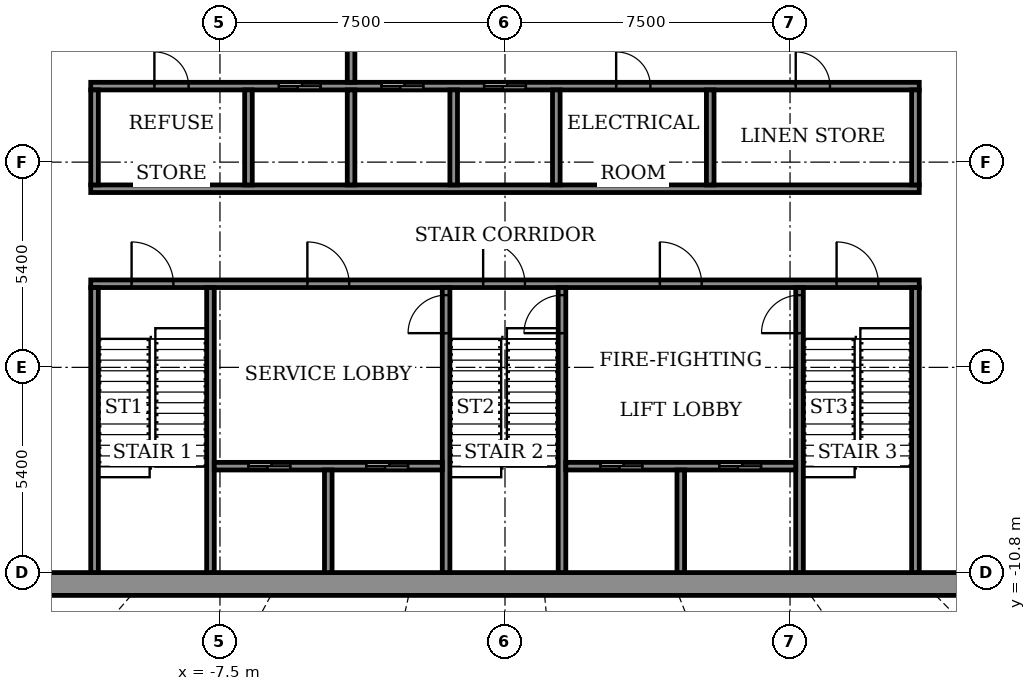
"""IFC4 building model, lengths in metres.
Left out: names, types, materials, properties, quantities, classifications, styles, units other than length and angle.
Written with IfcOpenShell. Run it as: python <this file> out.ifc"""

import sys

from ifc_helpers import new_model, si_unit, direction, frame, frame_2d, origin, place, context, subcontext, project, spatial, rectangle, extrude, element, fill, save


model = new_model("IFC4")
c1 = context("Model", 3, precision=1e-05, world=origin(), true_north=direction((0.0, 1.0)))
c2 = subcontext(c1, "Body", "Model", "MODEL_VIEW")
j1 = project(units=[si_unit("LENGTHUNIT", "METRE"), si_unit("PLANEANGLEUNIT", "RADIAN")], contexts=[c1])
p1 = place(None, origin())
s1 = spatial("IfcSite", under=j1, at=p1, CompositionType="ELEMENT")
p2 = place(p1, origin())
s2 = spatial("IfcBuilding", under=s1, at=p2, CompositionType="ELEMENT")
p3 = place(p2, frame((0.0, 0.0, 329.7)))
s3 = spatial("IfcBuildingStorey", under=s2, at=p3, CompositionType="ELEMENT", Elevation=329.7)
p4 = place(p3, frame((-14.4, -11.1, 0.0), z_axis=(0.0, 0.0, 1.0), x_axis=(1.0, 0.0, 0.0)))
e1 = element("IfcWall", 1, at=p4, inside=s3, PredefinedType="SHEAR", context=c2, shape_type="SweptSolid", body=[
    extrude(rectangle(XDim=28.8, YDim=0.6, at=frame_2d((14.4, 0.0))), origin(), (0.0, 0.0, 1.0), 4.6),
])
p5 = place(p3, frame((-10.9, -3.2, 0.0), z_axis=(0.0, 0.0, 1.0), x_axis=(1.0, 0.0, 0.0)))
e2 = element("IfcWall", 2, at=p5, inside=s3, PredefinedType="SHEAR", context=c2, shape_type="SweptSolid", body=[
    extrude(rectangle(XDim=21.8, YDim=0.2, at=frame_2d((10.9, 0.0))), origin(), (0.0, 0.0, 1.0), 4.05),
])
p6 = place(p5, frame((1.075, 0.0, 0.0)))
e3 = element("IfcOpeningElement", 3, at=p6, cuts=e2, PredefinedType="OPENING", context=c2, shape_type="SweptSolid", body=[
    extrude(rectangle(XDim=1.1, YDim=2.1, at=frame_2d((0.55, 1.05))), frame((0.0, 0.11, 0.0), z_axis=(0.0, -1.0, 0.0), x_axis=(1.0, 0.0, 0.0)), (0.0, 0.0, 1.0), 0.22),
])
p7 = place(p5, frame((10.325, 0.0, 0.0)))
e4 = element("IfcOpeningElement", 4, at=p7, cuts=e2, PredefinedType="OPENING", context=c2, shape_type="SweptSolid", body=[
    extrude(rectangle(XDim=1.1, YDim=2.1, at=frame_2d((0.55, 1.05))), frame((0.0, 0.11, 0.0), z_axis=(0.0, -1.0, 0.0), x_axis=(1.0, 0.0, 0.0)), (0.0, 0.0, 1.0), 0.22),
])
p8 = place(p5, frame((19.625, 0.0, 0.0)))
e5 = element("IfcOpeningElement", 5, at=p8, cuts=e2, PredefinedType="OPENING", context=c2, shape_type="SweptSolid", body=[
    extrude(rectangle(XDim=1.1, YDim=2.1, at=frame_2d((0.55, 1.05))), frame((0.0, 0.11, 0.0), z_axis=(0.0, -1.0, 0.0), x_axis=(1.0, 0.0, 0.0)), (0.0, 0.0, 1.0), 0.22),
])
p9 = place(p5, frame((5.7, 0.0, 0.0)))
e6 = element("IfcOpeningElement", 6, at=p9, cuts=e2, PredefinedType="OPENING", context=c2, shape_type="SweptSolid", body=[
    extrude(rectangle(XDim=1.1, YDim=2.1, at=frame_2d((0.55, 1.05))), frame((0.0, 0.11, 0.0), z_axis=(0.0, -1.0, 0.0), x_axis=(1.0, 0.0, 0.0)), (0.0, 0.0, 1.0), 0.22),
])
p10 = place(p5, frame((14.975, 0.0, 0.0)))
e7 = element("IfcOpeningElement", 7, at=p10, cuts=e2, PredefinedType="OPENING", context=c2, shape_type="SweptSolid", body=[
    extrude(rectangle(XDim=1.1, YDim=2.1, at=frame_2d((0.55, 1.05))), frame((0.0, 0.11, 0.0), z_axis=(0.0, -1.0, 0.0), x_axis=(1.0, 0.0, 0.0)), (0.0, 0.0, 1.0), 0.22),
])
p11 = place(p3, frame((-10.9, -0.7, 0.0), z_axis=(0.0, 0.0, 1.0), x_axis=(1.0, 0.0, 0.0)))
e8 = element("IfcWall", 8, at=p11, inside=s3, PredefinedType="SHEAR", context=c2, shape_type="SweptSolid", body=[
    extrude(rectangle(XDim=21.8, YDim=0.2, at=frame_2d((10.9, 0.0))), origin(), (0.0, 0.0, 1.0), 4.05),
])
p12 = place(p3, frame((-10.9, 2.0, 0.0), z_axis=(0.0, 0.0, 1.0), x_axis=(1.0, 0.0, 0.0)))
e9 = element("IfcWall", 9, at=p12, inside=s3, PredefinedType="SHEAR", context=c2, shape_type="SweptSolid", body=[
    extrude(rectangle(XDim=21.8, YDim=0.2, at=frame_2d((10.9, 0.0))), origin(), (0.0, 0.0, 1.0), 4.05),
])
p13 = place(p12, frame((4.95, 0.0, 0.0)))
e10 = element("IfcOpeningElement", 10, at=p13, cuts=e9, PredefinedType="OPENING", context=c2, shape_type="SweptSolid", body=[
    extrude(rectangle(XDim=1.1, YDim=2.1, at=frame_2d((0.55, 1.05))), frame((0.0, 0.11, 0.0), z_axis=(0.0, -1.0, 0.0), x_axis=(1.0, 0.0, 0.0)), (0.0, 0.0, 1.0), 0.22),
])
p14 = place(p12, frame((7.65, 0.0, 0.0)))
e11 = element("IfcOpeningElement", 11, at=p14, cuts=e9, PredefinedType="OPENING", context=c2, shape_type="SweptSolid", body=[
    extrude(rectangle(XDim=1.1, YDim=2.1, at=frame_2d((0.55, 1.05))), frame((0.0, 0.11, 0.0), z_axis=(0.0, -1.0, 0.0), x_axis=(1.0, 0.0, 0.0)), (0.0, 0.0, 1.0), 0.22),
])
p15 = place(p12, frame((10.35, 0.0, 0.0)))
e12 = element("IfcOpeningElement", 12, at=p15, cuts=e9, PredefinedType="OPENING", context=c2, shape_type="SweptSolid", body=[
    extrude(rectangle(XDim=1.1, YDim=2.1, at=frame_2d((0.55, 1.05))), frame((0.0, 0.11, 0.0), z_axis=(0.0, -1.0, 0.0), x_axis=(1.0, 0.0, 0.0)), (0.0, 0.0, 1.0), 0.22),
])
p16 = place(p12, frame((1.675, 0.0, 0.0)))
e13 = element("IfcOpeningElement", 13, at=p16, cuts=e9, PredefinedType="OPENING", context=c2, shape_type="SweptSolid", body=[
    extrude(rectangle(XDim=0.9, YDim=2.1, at=frame_2d((0.45, 1.05))), frame((0.0, 0.11, 0.0), z_axis=(0.0, -1.0, 0.0), x_axis=(1.0, 0.0, 0.0)), (0.0, 0.0, 1.0), 0.22),
])
p17 = place(p12, frame((13.825, 0.0, 0.0)))
e14 = element("IfcOpeningElement", 14, at=p17, cuts=e9, PredefinedType="OPENING", context=c2, shape_type="SweptSolid", body=[
    extrude(rectangle(XDim=0.9, YDim=2.1, at=frame_2d((0.45, 1.05))), frame((0.0, 0.11, 0.0), z_axis=(0.0, -1.0, 0.0), x_axis=(1.0, 0.0, 0.0)), (0.0, 0.0, 1.0), 0.22),
])
p18 = place(p12, frame((18.55, 0.0, 0.0)))
e15 = element("IfcOpeningElement", 15, at=p18, cuts=e9, PredefinedType="OPENING", context=c2, shape_type="SweptSolid", body=[
    extrude(rectangle(XDim=0.9, YDim=2.1, at=frame_2d((0.45, 1.05))), frame((0.0, 0.11, 0.0), z_axis=(0.0, -1.0, 0.0), x_axis=(1.0, 0.0, 0.0)), (0.0, 0.0, 1.0), 0.22),
])
for number, where, z_axis, x_axis in (
    (16, (-10.8, -10.8, 0.0), (0.0, 0.0, 1.0), (0.0, 1.0, 0.0)),
    (17, (-7.75, -10.8, 0.0), (0.0, 0.0, 1.0), (0.0, 1.0, 0.0)),
):
    element("IfcWall", number, at=place(p3, frame(where, z_axis=z_axis, x_axis=x_axis)), inside=s3, PredefinedType="SHEAR", context=c2, shape_type="SweptSolid", body=[
        extrude(rectangle(XDim=7.5, YDim=0.2, at=frame_2d((3.75, 0.0))), origin(), (0.0, 0.0, 1.0), 4.05),
    ])
p19 = place(p3, frame((-1.55, -10.8, 0.0), z_axis=(0.0, 0.0, 1.0), x_axis=(0.0, 1.0, 0.0)))
e18 = element("IfcWall", 18, at=p19, inside=s3, PredefinedType="SHEAR", context=c2, shape_type="SweptSolid", body=[
    extrude(rectangle(XDim=7.5, YDim=0.2, at=frame_2d((3.75, 0.0))), origin(), (0.0, 0.0, 1.0), 4.05),
])
p20 = place(p19, frame((6.3, 0.0, 0.0)))
e19 = element("IfcOpeningElement", 19, at=p20, cuts=e18, PredefinedType="OPENING", context=c2, shape_type="SweptSolid", body=[
    extrude(rectangle(XDim=1.0, YDim=2.1, at=frame_2d((0.5, 1.05))), frame((0.0, 0.11, 0.0), z_axis=(0.0, -1.0, 0.0), x_axis=(1.0, 0.0, 0.0)), (0.0, 0.0, 1.0), 0.22),
])
p21 = place(p3, frame((1.5, -10.8, 0.0), z_axis=(0.0, 0.0, 1.0), x_axis=(0.0, 1.0, 0.0)))
e20 = element("IfcWall", 20, at=p21, inside=s3, PredefinedType="SHEAR", context=c2, shape_type="SweptSolid", body=[
    extrude(rectangle(XDim=7.5, YDim=0.2, at=frame_2d((3.75, 0.0))), origin(), (0.0, 0.0, 1.0), 4.05),
])
p22 = place(p21, frame((6.3, 0.0, 0.0)))
e21 = element("IfcOpeningElement", 21, at=p22, cuts=e20, PredefinedType="OPENING", context=c2, shape_type="SweptSolid", body=[
    extrude(rectangle(XDim=1.0, YDim=2.1, at=frame_2d((0.5, 1.05))), frame((0.0, 0.11, 0.0), z_axis=(0.0, -1.0, 0.0), x_axis=(1.0, 0.0, 0.0)), (0.0, 0.0, 1.0), 0.22),
])
p23 = place(p3, frame((7.75, -10.8, 0.0), z_axis=(0.0, 0.0, 1.0), x_axis=(0.0, 1.0, 0.0)))
e22 = element("IfcWall", 22, at=p23, inside=s3, PredefinedType="SHEAR", context=c2, shape_type="SweptSolid", body=[
    extrude(rectangle(XDim=7.5, YDim=0.2, at=frame_2d((3.75, 0.0))), origin(), (0.0, 0.0, 1.0), 4.05),
])
p24 = place(p23, frame((6.3, 0.0, 0.0)))
e23 = element("IfcOpeningElement", 23, at=p24, cuts=e22, PredefinedType="OPENING", context=c2, shape_type="SweptSolid", body=[
    extrude(rectangle(XDim=1.0, YDim=2.1, at=frame_2d((0.5, 1.05))), frame((0.0, 0.11, 0.0), z_axis=(0.0, -1.0, 0.0), x_axis=(1.0, 0.0, 0.0)), (0.0, 0.0, 1.0), 0.22),
])
p25 = place(p3, frame((10.8, -10.8, 0.0), z_axis=(0.0, 0.0, 1.0), x_axis=(0.0, 1.0, 0.0)))
e24 = element("IfcWall", 24, at=p25, inside=s3, PredefinedType="SHEAR", context=c2, shape_type="SweptSolid", body=[
    extrude(rectangle(XDim=7.5, YDim=0.2, at=frame_2d((3.75, 0.0))), origin(), (0.0, 0.0, 1.0), 4.05),
])
p26 = place(p3, frame((-7.65, -8.0, 0.0), z_axis=(0.0, 0.0, 1.0), x_axis=(1.0, 0.0, 0.0)))
e25 = element("IfcWall", 25, at=p26, inside=s3, PredefinedType="SHEAR", context=c2, shape_type="SweptSolid", body=[
    extrude(rectangle(XDim=6.0, YDim=0.2, at=frame_2d((3.0, 0.0))), origin(), (0.0, 0.0, 1.0), 4.05),
])
p27 = place(p26, frame((0.9, 0.0, 0.0)))
e26 = element("IfcOpeningElement", 26, at=p27, cuts=e25, PredefinedType="OPENING", context=c2, shape_type="SweptSolid", body=[
    extrude(rectangle(XDim=1.1, YDim=2.1, at=frame_2d((0.55, 1.05))), frame((0.0, 0.11, 0.0), z_axis=(0.0, -1.0, 0.0), x_axis=(1.0, 0.0, 0.0)), (0.0, 0.0, 1.0), 0.22),
])
p28 = place(p26, frame((4.0, 0.0, 0.0)))
e27 = element("IfcOpeningElement", 27, at=p28, cuts=e25, PredefinedType="OPENING", context=c2, shape_type="SweptSolid", body=[
    extrude(rectangle(XDim=1.1, YDim=2.1, at=frame_2d((0.55, 1.05))), frame((0.0, 0.11, 0.0), z_axis=(0.0, -1.0, 0.0), x_axis=(1.0, 0.0, 0.0)), (0.0, 0.0, 1.0), 0.22),
])
p29 = place(p3, frame((-4.65, -10.8, 0.0), z_axis=(0.0, 0.0, 1.0), x_axis=(0.0, 1.0, 0.0)))
e28 = element("IfcWall", 28, at=p29, inside=s3, PredefinedType="SHEAR", context=c2, shape_type="SweptSolid", body=[
    extrude(rectangle(XDim=2.7, YDim=0.2, at=frame_2d((1.35, 0.0))), origin(), (0.0, 0.0, 1.0), 4.05),
])
p30 = place(p3, frame((1.6, -8.0, 0.0), z_axis=(0.0, 0.0, 1.0), x_axis=(1.0, 0.0, 0.0)))
e29 = element("IfcWall", 29, at=p30, inside=s3, PredefinedType="SHEAR", context=c2, shape_type="SweptSolid", body=[
    extrude(rectangle(XDim=6.05, YDim=0.2, at=frame_2d((3.025, 0.0))), origin(), (0.0, 0.0, 1.0), 4.05),
])
p31 = place(p30, frame((0.913, 0.0, 0.0)))
e30 = element("IfcOpeningElement", 30, at=p31, cuts=e29, PredefinedType="OPENING", context=c2, shape_type="SweptSolid", body=[
    extrude(rectangle(XDim=1.1, YDim=2.1, at=frame_2d((0.55, 1.05))), frame((0.0, 0.11, 0.0), z_axis=(0.0, -1.0, 0.0), x_axis=(1.0, 0.0, 0.0)), (0.0, 0.0, 1.0), 0.22),
])
p32 = place(p30, frame((4.038, 0.0, 0.0)))
e31 = element("IfcOpeningElement", 31, at=p32, cuts=e29, PredefinedType="OPENING", context=c2, shape_type="SweptSolid", body=[
    extrude(rectangle(XDim=1.1, YDim=2.1, at=frame_2d((0.55, 1.05))), frame((0.0, 0.11, 0.0), z_axis=(0.0, -1.0, 0.0), x_axis=(1.0, 0.0, 0.0)), (0.0, 0.0, 1.0), 0.22),
])
p33 = place(p3, frame((4.625, -10.8, 0.0), z_axis=(0.0, 0.0, 1.0), x_axis=(0.0, 1.0, 0.0)))
e32 = element("IfcWall", 32, at=p33, inside=s3, PredefinedType="SHEAR", context=c2, shape_type="SweptSolid", body=[
    extrude(rectangle(XDim=2.7, YDim=0.2, at=frame_2d((1.35, 0.0))), origin(), (0.0, 0.0, 1.0), 4.05),
])
p34 = place(p3, frame((-10.8, -0.6, 0.0), z_axis=(0.0, 0.0, 1.0), x_axis=(0.0, 1.0, 0.0)))
e33 = element("IfcWall", 33, at=p34, inside=s3, PredefinedType="STANDARD", context=c2, shape_type="SweptSolid", body=[
    extrude(rectangle(XDim=2.5, YDim=0.2, at=frame_2d((1.25, 0.0))), origin(), (0.0, 0.0, 1.0), 4.05),
])
for number, where, z_axis, x_axis in (
    (34, (-6.75, -0.6, 0.0), (0.0, 0.0, 1.0), (0.0, 1.0, 0.0)),
    (35, (-4.05, -0.6, 0.0), (0.0, 0.0, 1.0), (0.0, 1.0, 0.0)),
    (36, (-1.35, -0.6, 0.0), (0.0, 0.0, 1.0), (0.0, 1.0, 0.0)),
    (37, (1.35, -0.6, 0.0), (0.0, 0.0, 1.0), (0.0, 1.0, 0.0)),
):
    element("IfcWall", number, at=place(p3, frame(where, z_axis=z_axis, x_axis=x_axis)), inside=s3, PredefinedType="SHEAR", context=c2, shape_type="SweptSolid", body=[
        extrude(rectangle(XDim=2.5, YDim=0.2, at=frame_2d((1.25, 0.0))), origin(), (0.0, 0.0, 1.0), 4.05),
    ])
for number, where, z_axis, x_axis in (
    (38, (5.4, -0.6, 0.0), (0.0, 0.0, 1.0), (0.0, 1.0, 0.0)),
    (39, (10.8, -0.6, 0.0), (0.0, 0.0, 1.0), (0.0, 1.0, 0.0)),
):
    element("IfcWall", number, at=place(p3, frame(where, z_axis=z_axis, x_axis=x_axis)), inside=s3, PredefinedType="STANDARD", context=c2, shape_type="SweptSolid", body=[
        extrude(rectangle(XDim=2.5, YDim=0.2, at=frame_2d((1.25, 0.0))), origin(), (0.0, 0.0, 1.0), 4.05),
    ])
p35 = place(p3, frame((-4.05, 2.1, 0.0), z_axis=(0.0, 0.0, 1.0), x_axis=(0.0, 1.0, 0.0)))
e40 = element("IfcWall", 40, at=p35, inside=s3, PredefinedType="STANDARD", context=c2, shape_type="SweptSolid", body=[
    extrude(rectangle(XDim=5.9, YDim=0.2, at=frame_2d((2.95, 0.0))), origin(), (0.0, 0.0, 1.0), 4.05),
])
p36 = place(p35, frame((2.35, 0.0, 0.0)))
e41 = element("IfcOpeningElement", 41, at=p36, cuts=e40, PredefinedType="OPENING", context=c2, shape_type="SweptSolid", body=[
    extrude(rectangle(XDim=1.2, YDim=2.1, at=frame_2d((0.6, 1.05))), frame((0.0, 0.11, 0.0), z_axis=(0.0, -1.0, 0.0), x_axis=(1.0, 0.0, 0.0)), (0.0, 0.0, 1.0), 0.22),
])
p37 = place(p13, origin())
e42 = element("IfcDoor", 42, at=p37, inside=s3, OperationType="SLIDING_TO_LEFT", PredefinedType="DOOR", context=c2, shape_type="SweptSolid", body=[
    extrude(rectangle(XDim=1.1, YDim=2.1, at=frame_2d((0.55, 1.05))), frame((0.0, 0.025, 0.0), z_axis=(0.0, -1.0, 0.0), x_axis=(1.0, 0.0, 0.0)), (0.0, 0.0, 1.0), 0.05),
])
fill(e10, e42)
p38 = place(p14, origin())
e43 = element("IfcDoor", 43, at=p38, inside=s3, OperationType="SLIDING_TO_LEFT", PredefinedType="DOOR", context=c2, shape_type="SweptSolid", body=[
    extrude(rectangle(XDim=1.1, YDim=2.1, at=frame_2d((0.55, 1.05))), frame((0.0, 0.025, 0.0), z_axis=(0.0, -1.0, 0.0), x_axis=(1.0, 0.0, 0.0)), (0.0, 0.0, 1.0), 0.05),
])
fill(e11, e43)
p39 = place(p15, origin())
e44 = element("IfcDoor", 44, at=p39, inside=s3, OperationType="SLIDING_TO_LEFT", PredefinedType="DOOR", context=c2, shape_type="SweptSolid", body=[
    extrude(rectangle(XDim=1.1, YDim=2.1, at=frame_2d((0.55, 1.05))), frame((0.0, 0.025, 0.0), z_axis=(0.0, -1.0, 0.0), x_axis=(1.0, 0.0, 0.0)), (0.0, 0.0, 1.0), 0.05),
])
fill(e12, e44)
p40 = place(p16, origin())
e45 = element("IfcDoor", 45, at=p40, inside=s3, OperationType="SINGLE_SWING_RIGHT", PredefinedType="DOOR", context=c2, shape_type="SweptSolid", body=[
    extrude(rectangle(XDim=0.9, YDim=2.1, at=frame_2d((0.45, 1.05))), frame((0.0, 0.025, 0.0), z_axis=(0.0, -1.0, 0.0), x_axis=(1.0, 0.0, 0.0)), (0.0, 0.0, 1.0), 0.05),
])
fill(e13, e45)
p41 = place(p17, origin())
e46 = element("IfcDoor", 46, at=p41, inside=s3, OperationType="SINGLE_SWING_LEFT", PredefinedType="DOOR", context=c2, shape_type="SweptSolid", body=[
    extrude(rectangle(XDim=0.9, YDim=2.1, at=frame_2d((0.45, 1.05))), frame((0.0, 0.025, 0.0), z_axis=(0.0, -1.0, 0.0), x_axis=(1.0, 0.0, 0.0)), (0.0, 0.0, 1.0), 0.05),
])
fill(e14, e46)
p42 = place(p18, origin())
e47 = element("IfcDoor", 47, at=p42, inside=s3, OperationType="SINGLE_SWING_RIGHT", PredefinedType="DOOR", context=c2, shape_type="SweptSolid", body=[
    extrude(rectangle(XDim=0.9, YDim=2.1, at=frame_2d((0.45, 1.05))), frame((0.0, 0.025, 0.0), z_axis=(0.0, -1.0, 0.0), x_axis=(1.0, 0.0, 0.0)), (0.0, 0.0, 1.0), 0.05),
])
fill(e15, e47)
p43 = place(p31, origin())
e48 = element("IfcDoor", 48, at=p43, inside=s3, OperationType="SLIDING_TO_LEFT", PredefinedType="DOOR", context=c2, shape_type="SweptSolid", body=[
    extrude(rectangle(XDim=1.1, YDim=2.1, at=frame_2d((0.55, 1.05))), frame((0.0, 0.025, 0.0), z_axis=(0.0, -1.0, 0.0), x_axis=(1.0, 0.0, 0.0)), (0.0, 0.0, 1.0), 0.05),
])
fill(e30, e48)
p44 = place(p27, origin())
e49 = element("IfcDoor", 49, at=p44, inside=s3, OperationType="SLIDING_TO_LEFT", PredefinedType="DOOR", context=c2, shape_type="SweptSolid", body=[
    extrude(rectangle(XDim=1.1, YDim=2.1, at=frame_2d((0.55, 1.05))), frame((0.0, 0.025, 0.0), z_axis=(0.0, -1.0, 0.0), x_axis=(1.0, 0.0, 0.0)), (0.0, 0.0, 1.0), 0.05),
])
fill(e26, e49)
p45 = place(p32, origin())
e50 = element("IfcDoor", 50, at=p45, inside=s3, OperationType="SLIDING_TO_LEFT", PredefinedType="DOOR", context=c2, shape_type="SweptSolid", body=[
    extrude(rectangle(XDim=1.1, YDim=2.1, at=frame_2d((0.55, 1.05))), frame((0.0, 0.025, 0.0), z_axis=(0.0, -1.0, 0.0), x_axis=(1.0, 0.0, 0.0)), (0.0, 0.0, 1.0), 0.05),
])
fill(e31, e50)
p46 = place(p28, origin())
e51 = element("IfcDoor", 51, at=p46, inside=s3, OperationType="SLIDING_TO_LEFT", PredefinedType="DOOR", context=c2, shape_type="SweptSolid", body=[
    extrude(rectangle(XDim=1.1, YDim=2.1, at=frame_2d((0.55, 1.05))), frame((0.0, 0.025, 0.0), z_axis=(0.0, -1.0, 0.0), x_axis=(1.0, 0.0, 0.0)), (0.0, 0.0, 1.0), 0.05),
])
fill(e27, e51)
p47 = place(p6, origin())
e52 = element("IfcDoor", 52, at=p47, inside=s3, OperationType="SINGLE_SWING_RIGHT", PredefinedType="DOOR", context=c2, shape_type="SweptSolid", body=[
    extrude(rectangle(XDim=1.1, YDim=2.1, at=frame_2d((0.55, 1.05))), frame((0.0, 0.025, 0.0), z_axis=(0.0, -1.0, 0.0), x_axis=(1.0, 0.0, 0.0)), (0.0, 0.0, 1.0), 0.05),
])
fill(e3, e52)
p48 = place(p7, origin())
e53 = element("IfcDoor", 53, at=p48, inside=s3, OperationType="SINGLE_SWING_RIGHT", PredefinedType="DOOR", context=c2, shape_type="SweptSolid", body=[
    extrude(rectangle(XDim=1.1, YDim=2.1, at=frame_2d((0.55, 1.05))), frame((0.0, 0.025, 0.0), z_axis=(0.0, -1.0, 0.0), x_axis=(1.0, 0.0, 0.0)), (0.0, 0.0, 1.0), 0.05),
])
fill(e4, e53)
p49 = place(p8, origin())
e54 = element("IfcDoor", 54, at=p49, inside=s3, OperationType="SINGLE_SWING_RIGHT", PredefinedType="DOOR", context=c2, shape_type="SweptSolid", body=[
    extrude(rectangle(XDim=1.1, YDim=2.1, at=frame_2d((0.55, 1.05))), frame((0.0, 0.025, 0.0), z_axis=(0.0, -1.0, 0.0), x_axis=(1.0, 0.0, 0.0)), (0.0, 0.0, 1.0), 0.05),
])
fill(e5, e54)
p50 = place(p9, origin())
e55 = element("IfcDoor", 55, at=p50, inside=s3, OperationType="SINGLE_SWING_LEFT", PredefinedType="DOOR", context=c2, shape_type="SweptSolid", body=[
    extrude(rectangle(XDim=1.1, YDim=2.1, at=frame_2d((0.55, 1.05))), frame((0.0, 0.025, 0.0), z_axis=(0.0, -1.0, 0.0), x_axis=(1.0, 0.0, 0.0)), (0.0, 0.0, 1.0), 0.05),
])
fill(e6, e55)
p51 = place(p10, origin())
e56 = element("IfcDoor", 56, at=p51, inside=s3, OperationType="SINGLE_SWING_LEFT", PredefinedType="DOOR", context=c2, shape_type="SweptSolid", body=[
    extrude(rectangle(XDim=1.1, YDim=2.1, at=frame_2d((0.55, 1.05))), frame((0.0, 0.025, 0.0), z_axis=(0.0, -1.0, 0.0), x_axis=(1.0, 0.0, 0.0)), (0.0, 0.0, 1.0), 0.05),
])
fill(e7, e56)
p52 = place(p20, origin())
e57 = element("IfcDoor", 57, at=p52, inside=s3, OperationType="SINGLE_SWING_RIGHT", PredefinedType="DOOR", context=c2, shape_type="SweptSolid", body=[
    extrude(rectangle(XDim=1.0, YDim=2.1, at=frame_2d((0.5, 1.05))), frame((0.0, 0.025, 0.0), z_axis=(0.0, -1.0, 0.0), x_axis=(1.0, 0.0, 0.0)), (0.0, 0.0, 1.0), 0.05),
])
fill(e19, e57)
p53 = place(p22, origin())
e58 = element("IfcDoor", 58, at=p53, inside=s3, OperationType="SINGLE_SWING_RIGHT", PredefinedType="DOOR", context=c2, shape_type="SweptSolid", body=[
    extrude(rectangle(XDim=1.0, YDim=2.1, at=frame_2d((0.5, 1.05))), frame((0.0, 0.025, 0.0), z_axis=(0.0, -1.0, 0.0), x_axis=(1.0, 0.0, 0.0)), (0.0, 0.0, 1.0), 0.05),
])
fill(e21, e58)
p54 = place(p24, origin())
e59 = element("IfcDoor", 59, at=p54, inside=s3, OperationType="SINGLE_SWING_RIGHT", PredefinedType="DOOR", context=c2, shape_type="SweptSolid", body=[
    extrude(rectangle(XDim=1.0, YDim=2.1, at=frame_2d((0.5, 1.05))), frame((0.0, 0.025, 0.0), z_axis=(0.0, -1.0, 0.0), x_axis=(1.0, 0.0, 0.0)), (0.0, 0.0, 1.0), 0.05),
])
fill(e23, e59)
save(model, sys.argv[1])
